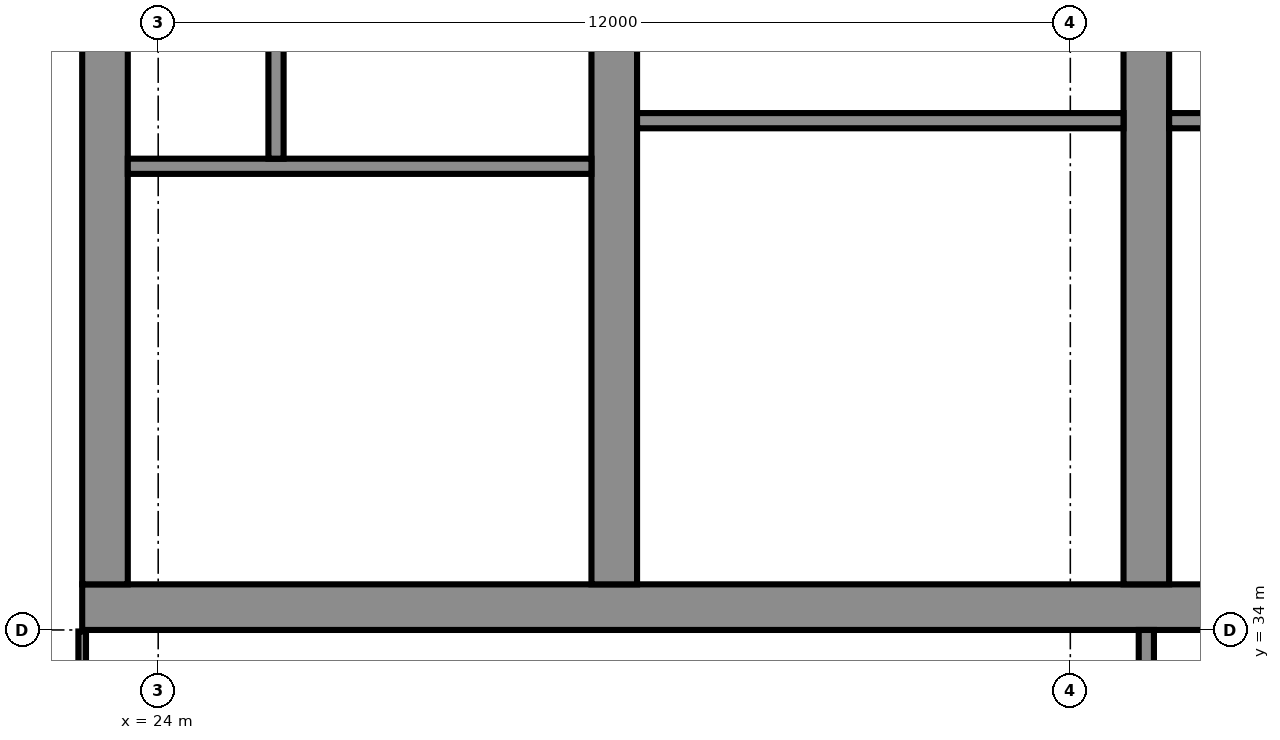
"""IFC4 building model, lengths in metres.
Left out: names, types, materials, properties, quantities, classifications, styles, units other than length and angle.
Written with IfcOpenShell. Run it as: python <this file> out.ifc"""

import sys

from ifc_helpers import new_model, si_unit, direction, frame, frame_2d, origin, place, context, subcontext, project, spatial, polyline, rectangle, outline, extrude, element, fill, save


model = new_model("IFC4")
c1 = context("Model", 3, precision=1e-05, world=origin(), true_north=direction((0.0, 1.0)))
c2 = subcontext(c1, "Body", "Model", "MODEL_VIEW")
j1 = project(units=[si_unit("LENGTHUNIT", "METRE"), si_unit("PLANEANGLEUNIT", "RADIAN")], contexts=[c1])
p1 = place(None, origin())
s1 = spatial("IfcSite", under=j1, at=p1, CompositionType="ELEMENT")
p2 = place(p1, origin())
s2 = spatial("IfcBuilding", under=s1, at=p2, CompositionType="ELEMENT")
p3 = place(p2, frame((0.0, 0.0, 207.1)))
s3 = spatial("IfcBuildingStorey", under=s2, at=p3, CompositionType="ELEMENT", Elevation=207.1)
p4 = place(p3, frame((23.0, 34.3, 0.0), z_axis=(0.0, 0.0, 1.0), x_axis=(1.0, 0.0, 0.0)))
e1 = element("IfcWall", 1, at=p4, inside=s3, PredefinedType="SHEAR", context=c2, shape_type="SweptSolid", body=[
    extrude(rectangle(XDim=35.0, YDim=0.6, at=frame_2d((17.5, 0.0))), origin(), (0.0, 0.0, 1.0), 3.6),
])
p5 = place(p4, frame((0.65, 0.0, 0.0)))
e2 = element("IfcOpeningElement", 2, at=p5, cuts=e1, PredefinedType="OPENING", context=c2, shape_type="SweptSolid", body=[
    extrude(rectangle(XDim=1.2, YDim=2.1, at=frame_2d((0.6, 1.05))), frame((0.0, 0.31, 0.0), z_axis=(0.0, -1.0, 0.0), x_axis=(1.0, 0.0, 0.0)), (0.0, 0.0, 1.0), 0.62),
])
p6 = place(p4, frame((7.717, 0.0, 0.0)))
e3 = element("IfcOpeningElement", 3, at=p6, cuts=e1, PredefinedType="OPENING", context=c2, shape_type="SweptSolid", body=[
    extrude(rectangle(XDim=1.1, YDim=2.1, at=frame_2d((0.55, 1.05))), frame((0.0, 0.31, 0.0), z_axis=(0.0, -1.0, 0.0), x_axis=(1.0, 0.0, 0.0)), (0.0, 0.0, 1.0), 0.62),
])
p7 = place(p4, frame((12.183, 0.0, 0.0)))
e4 = element("IfcOpeningElement", 4, at=p7, cuts=e1, PredefinedType="OPENING", context=c2, shape_type="SweptSolid", body=[
    extrude(rectangle(XDim=1.1, YDim=2.1, at=frame_2d((0.55, 1.05))), frame((0.0, 0.31, 0.0), z_axis=(0.0, -1.0, 0.0), x_axis=(1.0, 0.0, 0.0)), (0.0, 0.0, 1.0), 0.62),
])
p8 = place(p4, frame((9.8, 0.0, 0.0)))
e5 = element("IfcOpeningElement", 5, at=p8, cuts=e1, PredefinedType="OPENING", context=c2, shape_type="SweptSolid", body=[
    extrude(rectangle(XDim=1.4, YDim=2.1, at=frame_2d((0.7, 1.05))), frame((0.0, 0.31, 0.0), z_axis=(0.0, -1.0, 0.0), x_axis=(1.0, 0.0, 0.0)), (0.0, 0.0, 1.0), 0.62),
])
p9 = place(p4, frame((14.717, 0.0, 0.0)))
e6 = element("IfcOpeningElement", 6, at=p9, cuts=e1, PredefinedType="OPENING", context=c2, shape_type="SweptSolid", body=[
    extrude(rectangle(XDim=1.1, YDim=2.1, at=frame_2d((0.55, 1.05))), frame((0.0, 0.31, 0.0), z_axis=(0.0, -1.0, 0.0), x_axis=(1.0, 0.0, 0.0)), (0.0, 0.0, 1.0), 0.62),
])
p10 = place(p4, frame((16.95, 0.0, 0.0)))
e7 = element("IfcOpeningElement", 7, at=p10, cuts=e1, PredefinedType="OPENING", context=c2, shape_type="SweptSolid", body=[
    extrude(rectangle(XDim=1.1, YDim=2.1, at=frame_2d((0.55, 1.05))), frame((0.0, 0.31, 0.0), z_axis=(0.0, -1.0, 0.0), x_axis=(1.0, 0.0, 0.0)), (0.0, 0.0, 1.0), 0.62),
])
p11 = place(p4, frame((19.183, 0.0, 0.0)))
e8 = element("IfcOpeningElement", 8, at=p11, cuts=e1, PredefinedType="OPENING", context=c2, shape_type="SweptSolid", body=[
    extrude(rectangle(XDim=1.1, YDim=2.1, at=frame_2d((0.55, 1.05))), frame((0.0, 0.31, 0.0), z_axis=(0.0, -1.0, 0.0), x_axis=(1.0, 0.0, 0.0)), (0.0, 0.0, 1.0), 0.62),
])
p12 = place(p4, frame((26.15, 0.0, 0.0)))
e9 = element("IfcOpeningElement", 9, at=p12, cuts=e1, PredefinedType="OPENING", context=c2, shape_type="SweptSolid", body=[
    extrude(rectangle(XDim=1.2, YDim=2.1, at=frame_2d((0.6, 1.05))), frame((0.0, 0.31, 0.0), z_axis=(0.0, -1.0, 0.0), x_axis=(1.0, 0.0, 0.0)), (0.0, 0.0, 1.0), 0.62),
])
p13 = place(p4, frame((28.767, 0.0, 0.0)))
e10 = element("IfcOpeningElement", 10, at=p13, cuts=e1, PredefinedType="OPENING", context=c2, shape_type="SweptSolid", body=[
    extrude(rectangle(XDim=1.0, YDim=2.1, at=frame_2d((0.5, 1.05))), frame((0.0, 0.31, 0.0), z_axis=(0.0, -1.0, 0.0), x_axis=(1.0, 0.0, 0.0)), (0.0, 0.0, 1.0), 0.62),
])
p14 = place(p4, frame((33.083, 0.0, 0.0)))
e11 = element("IfcOpeningElement", 11, at=p14, cuts=e1, PredefinedType="OPENING", context=c2, shape_type="SweptSolid", body=[
    extrude(rectangle(XDim=1.0, YDim=2.1, at=frame_2d((0.5, 1.05))), frame((0.0, 0.31, 0.0), z_axis=(0.0, -1.0, 0.0), x_axis=(1.0, 0.0, 0.0)), (0.0, 0.0, 1.0), 0.62),
])
p15 = place(p4, frame((30.8, 0.0, 0.0)))
e12 = element("IfcOpeningElement", 12, at=p15, cuts=e1, PredefinedType="OPENING", context=c2, shape_type="SweptSolid", body=[
    extrude(rectangle(XDim=1.4, YDim=2.1, at=frame_2d((0.7, 1.05))), frame((0.0, 0.31, 0.0), z_axis=(0.0, -1.0, 0.0), x_axis=(1.0, 0.0, 0.0)), (0.0, 0.0, 1.0), 0.62),
])
p16 = place(p3, frame((23.3, 34.6, 0.0), z_axis=(0.0, 0.0, 1.0), x_axis=(0.0, 1.0, 0.0)))
e13 = element("IfcWall", 13, at=p16, inside=s3, PredefinedType="SHEAR", context=c2, shape_type="SweptSolid", body=[
    extrude(rectangle(XDim=13.585, YDim=0.6, at=frame_2d((6.792, 0.0))), origin(), (0.0, 0.0, 1.0), 3.6),
])
p17 = place(p3, frame((30.0, 34.6, 0.0), z_axis=(0.0, 0.0, 1.0), x_axis=(0.0, 1.0, 0.0)))
e14 = element("IfcWall", 14, at=p17, inside=s3, PredefinedType="SHEAR", context=c2, shape_type="SweptSolid", body=[
    extrude(rectangle(XDim=14.171, YDim=0.6, at=frame_2d((7.085, 0.0))), origin(), (0.0, 0.0, 1.0), 3.6),
])
p18 = place(p17, frame((3.8, 0.0, 0.0)))
e15 = element("IfcOpeningElement", 15, at=p18, cuts=e14, PredefinedType="OPENING", context=c2, shape_type="SweptSolid", body=[
    extrude(rectangle(XDim=1.1, YDim=2.1, at=frame_2d((0.55, 1.05))), frame((0.0, 0.31, 0.0), z_axis=(0.0, -1.0, 0.0), x_axis=(1.0, 0.0, 0.0)), (0.0, 0.0, 1.0), 0.62),
])
p19 = place(p3, frame((37.0, 34.6, 0.0), z_axis=(0.0, 0.0, 1.0), x_axis=(0.0, 1.0, 0.0)))
e16 = element("IfcWall", 16, at=p19, inside=s3, PredefinedType="SHEAR", context=c2, shape_type="SweptSolid", body=[
    extrude(rectangle(XDim=14.784, YDim=0.6, at=frame_2d((7.392, 0.0))), origin(), (0.0, 0.0, 1.0), 3.6),
])
p20 = place(p19, frame((11.302, 0.0, 0.0)))
e17 = element("IfcOpeningElement", 17, at=p20, cuts=e16, PredefinedType="OPENING", context=c2, shape_type="SweptSolid", body=[
    extrude(rectangle(XDim=1.0, YDim=2.1, at=frame_2d((0.5, 1.05))), frame((0.0, 0.31, 0.0), z_axis=(0.0, -1.0, 0.0), x_axis=(1.0, 0.0, 0.0)), (0.0, 0.0, 1.0), 0.62),
])
p21 = place(p19, frame((3.8, 0.0, 0.0)))
e18 = element("IfcOpeningElement", 18, at=p21, cuts=e16, PredefinedType="OPENING", context=c2, shape_type="SweptSolid", body=[
    extrude(rectangle(XDim=1.1, YDim=2.1, at=frame_2d((0.55, 1.05))), frame((0.0, 0.31, 0.0), z_axis=(0.0, -1.0, 0.0), x_axis=(1.0, 0.0, 0.0)), (0.0, 0.0, 1.0), 0.62),
])
p22 = place(p3, frame((23.6, 40.1, 0.0), z_axis=(0.0, 0.0, 1.0), x_axis=(1.0, 0.0, 0.0)))
e19 = element("IfcWall", 19, at=p22, inside=s3, PredefinedType="SHEAR", context=c2, shape_type="SweptSolid", body=[
    extrude(rectangle(XDim=6.1, YDim=0.2, at=frame_2d((3.05, 0.0))), origin(), (0.0, 0.0, 1.0), 3.2),
])
p23 = place(p22, frame((3.325, 0.0, 0.0)))
e20 = element("IfcOpeningElement", 20, at=p23, cuts=e19, PredefinedType="OPENING", context=c2, shape_type="SweptSolid", body=[
    extrude(rectangle(XDim=1.2, YDim=2.1, at=frame_2d((0.6, 1.05))), frame((0.0, 0.11, 0.0), z_axis=(0.0, -1.0, 0.0), x_axis=(1.0, 0.0, 0.0)), (0.0, 0.0, 1.0), 0.22),
])
p24 = place(p22, frame((0.475, 0.0, 0.0)))
e21 = element("IfcOpeningElement", 21, at=p24, cuts=e19, PredefinedType="OPENING", context=c2, shape_type="SweptSolid", body=[
    extrude(rectangle(XDim=0.9, YDim=2.1, at=frame_2d((0.45, 1.05))), frame((0.0, 0.11, 0.0), z_axis=(0.0, -1.0, 0.0), x_axis=(1.0, 0.0, 0.0)), (0.0, 0.0, 1.0), 0.22),
])
p25 = place(p3, frame((25.55, 40.2, 0.0), z_axis=(0.0, 0.0, 1.0), x_axis=(0.0, 1.0, 0.0)))
e22 = element("IfcWall", 22, at=p25, inside=s3, PredefinedType="SHEAR", context=c2, shape_type="SweptSolid", body=[
    extrude(rectangle(XDim=7.2, YDim=0.2, at=frame_2d((3.6, 0.0))), origin(), (0.0, 0.0, 1.0), 3.2),
])
p26 = place(p3, frame((30.3, 40.7, 0.0), z_axis=(0.0, 0.0, 1.0), x_axis=(1.0, 0.0, 0.0)))
e23 = element("IfcWall", 23, at=p26, inside=s3, PredefinedType="PARTITIONING", context=c2, shape_type="SweptSolid", body=[
    extrude(rectangle(XDim=6.4, YDim=0.2, at=frame_2d((3.2, 0.0))), origin(), (0.0, 0.0, 1.0), 3.2),
])
p27 = place(p26, frame((0.417, 0.0, 0.0)))
e24 = element("IfcOpeningElement", 24, at=p27, cuts=e23, PredefinedType="OPENING", context=c2, shape_type="SweptSolid", body=[
    extrude(rectangle(XDim=1.1, YDim=2.1, at=frame_2d((0.55, 1.05))), frame((0.0, 0.11, 0.0), z_axis=(0.0, -1.0, 0.0), x_axis=(1.0, 0.0, 0.0)), (0.0, 0.0, 1.0), 0.22),
])
p28 = place(p26, frame((2.65, 0.0, 0.0)))
e25 = element("IfcOpeningElement", 25, at=p28, cuts=e23, PredefinedType="OPENING", context=c2, shape_type="SweptSolid", body=[
    extrude(rectangle(XDim=1.1, YDim=2.1, at=frame_2d((0.55, 1.05))), frame((0.0, 0.11, 0.0), z_axis=(0.0, -1.0, 0.0), x_axis=(1.0, 0.0, 0.0)), (0.0, 0.0, 1.0), 0.22),
])
p29 = place(p26, frame((4.883, 0.0, 0.0)))
e26 = element("IfcOpeningElement", 26, at=p29, cuts=e23, PredefinedType="OPENING", context=c2, shape_type="SweptSolid", body=[
    extrude(rectangle(XDim=1.1, YDim=2.1, at=frame_2d((0.55, 1.05))), frame((0.0, 0.11, 0.0), z_axis=(0.0, -1.0, 0.0), x_axis=(1.0, 0.0, 0.0)), (0.0, 0.0, 1.0), 0.22),
])
p30 = place(p3, frame((0.0, 0.0, -0.0)))
e27 = element("IfcWall", 27, at=p30, inside=s3, PredefinedType="PARTITIONING", context=c2, shape_type="SweptSolid", body=[
    extrude(outline(polyline([(32.233, 37.45), (30.3, 37.45), (30.3, 37.65), (32.233, 37.65), (32.433, 37.65), (32.433, 34.6), (32.233, 34.6), (32.233, 37.45)])), origin(), (0.0, 0.0, 1.0), 3.2),
])
p31 = place(p3, frame((0.0, 0.0, -0.0)))
e28 = element("IfcWall", 28, at=p31, inside=s3, PredefinedType="PARTITIONING", context=c2, shape_type="SweptSolid", body=[
    extrude(outline(polyline([(34.567, 37.65), (34.767, 37.65), (36.7, 37.65), (36.7, 37.45), (34.767, 37.45), (34.767, 34.6), (34.567, 34.6), (34.567, 37.65)])), origin(), (0.0, 0.0, 1.0), 3.2),
])
p32 = place(p3, frame((0.0, 0.0, -0.0)))
e29 = element("IfcWall", 29, at=p32, inside=s3, PredefinedType="PARTITIONING", context=c2, shape_type="SweptSolid", body=[
    extrude(outline(polyline([(32.433, 40.8), (32.233, 40.8), (32.233, 43.8), (30.3, 43.8), (30.3, 44.0), (36.7, 44.0), (36.7, 43.8), (34.767, 43.8), (34.767, 40.8), (34.567, 40.8), (34.567, 43.8), (32.433, 43.8), (32.433, 40.8)])), origin(), (0.0, 0.0, 1.0), 3.2),
])
p33 = place(p3, frame((37.3, 40.7, 0.0), z_axis=(0.0, 0.0, 1.0), x_axis=(1.0, 0.0, 0.0)))
e30 = element("IfcWall", 30, at=p33, inside=s3, PredefinedType="PARTITIONING", context=c2, shape_type="SweptSolid", body=[
    extrude(rectangle(XDim=6.4, YDim=0.2, at=frame_2d((3.2, 0.0))), origin(), (0.0, 0.0, 1.0), 3.2),
])
p34 = place(p33, frame((0.417, 0.0, 0.0)))
e31 = element("IfcOpeningElement", 31, at=p34, cuts=e30, PredefinedType="OPENING", context=c2, shape_type="SweptSolid", body=[
    extrude(rectangle(XDim=1.1, YDim=2.1, at=frame_2d((0.55, 1.05))), frame((0.0, 0.11, 0.0), z_axis=(0.0, -1.0, 0.0), x_axis=(1.0, 0.0, 0.0)), (0.0, 0.0, 1.0), 0.22),
])
p35 = place(p33, frame((2.65, 0.0, 0.0)))
e32 = element("IfcOpeningElement", 32, at=p35, cuts=e30, PredefinedType="OPENING", context=c2, shape_type="SweptSolid", body=[
    extrude(rectangle(XDim=1.1, YDim=2.1, at=frame_2d((0.55, 1.05))), frame((0.0, 0.11, 0.0), z_axis=(0.0, -1.0, 0.0), x_axis=(1.0, 0.0, 0.0)), (0.0, 0.0, 1.0), 0.22),
])
p36 = place(p33, frame((4.883, 0.0, 0.0)))
e33 = element("IfcOpeningElement", 33, at=p36, cuts=e30, PredefinedType="OPENING", context=c2, shape_type="SweptSolid", body=[
    extrude(rectangle(XDim=1.1, YDim=2.1, at=frame_2d((0.55, 1.05))), frame((0.0, 0.11, 0.0), z_axis=(0.0, -1.0, 0.0), x_axis=(1.0, 0.0, 0.0)), (0.0, 0.0, 1.0), 0.22),
])
p37 = place(p3, frame((0.0, 0.0, -0.0)))
e34 = element("IfcWall", 34, at=p37, inside=s3, PredefinedType="PARTITIONING", context=c2, shape_type="SweptSolid", body=[
    extrude(outline(polyline([(41.567, 37.1), (39.433, 37.1), (39.433, 34.6), (39.233, 34.6), (39.233, 37.45), (37.3, 37.45), (37.3, 37.65), (39.233, 37.65), (39.433, 37.65), (39.433, 37.3), (41.567, 37.3), (41.567, 37.35), (41.767, 37.35), (43.7, 37.35), (43.7, 37.15), (41.767, 37.15), (41.767, 34.6), (41.567, 34.6), (41.567, 37.1)])), origin(), (0.0, 0.0, 1.0), 3.2),
])
p38 = place(p3, frame((0.0, 0.0, -0.0)))
e35 = element("IfcWall", 35, at=p38, inside=s3, PredefinedType="PARTITIONING", context=c2, shape_type="SweptSolid", body=[
    extrude(outline(polyline([(39.433, 40.8), (39.233, 40.8), (39.233, 43.8), (37.3, 43.8), (37.3, 44.0), (43.7, 44.0), (43.7, 43.8), (41.767, 43.8), (41.767, 40.8), (41.567, 40.8), (41.567, 43.8), (39.433, 43.8), (39.433, 40.8)])), origin(), (0.0, 0.0, 1.0), 3.2),
])
p39 = place(p3, frame((37.0, 30.5, 0.0), z_axis=(0.0, 0.0, 1.0), x_axis=(0.0, 1.0, 0.0)))
e36 = element("IfcWall", 36, at=p39, inside=s3, PredefinedType="PARTITIONING", context=c2, shape_type="SweptSolid", body=[
    extrude(rectangle(XDim=3.5, YDim=0.2, at=frame_2d((1.75, 0.0))), origin(), (0.0, 0.0, 1.0), 3.2),
])
p40 = place(p39, frame((1.2, 0.0, 0.0)))
e37 = element("IfcOpeningElement", 37, at=p40, cuts=e36, PredefinedType="OPENING", context=c2, shape_type="SweptSolid", body=[
    extrude(rectangle(XDim=1.1, YDim=2.1, at=frame_2d((0.55, 1.05))), frame((0.0, 0.11, 0.0), z_axis=(0.0, -1.0, 0.0), x_axis=(1.0, 0.0, 0.0)), (0.0, 0.0, 1.0), 0.22),
])
p41 = place(p3, frame((23.0, 30.5, 0.0), z_axis=(0.0, 0.0, 1.0), x_axis=(0.0, 1.0, 0.0)))
e38 = element("IfcWall", 38, at=p41, inside=s3, PredefinedType="PARTITIONING", context=c2, shape_type="SweptSolid", body=[
    extrude(rectangle(XDim=3.48, YDim=0.1, at=frame_2d((1.74, 0.0))), origin(), (0.0, 0.0, 1.0), 3.2),
])
p42 = place(p41, frame((1.28, 0.0, 0.0)))
e39 = element("IfcOpeningElement", 39, at=p42, cuts=e38, PredefinedType="OPENING", context=c2, shape_type="SweptSolid", body=[
    extrude(rectangle(XDim=1.0, YDim=2.1, at=frame_2d((0.5, 1.05))), frame((0.0, 0.06, 0.0), z_axis=(0.0, -1.0, 0.0), x_axis=(1.0, 0.0, 0.0)), (0.0, 0.0, 1.0), 0.12),
])
p43 = place(p23, origin())
e40 = element("IfcDoor", 40, at=p43, inside=s3, OperationType="SINGLE_SWING_RIGHT", PredefinedType="DOOR", context=c2, shape_type="SweptSolid", body=[
    extrude(rectangle(XDim=1.2, YDim=2.1, at=frame_2d((0.6, 1.05))), frame((0.0, 0.025, 0.0), z_axis=(0.0, -1.0, 0.0), x_axis=(1.0, 0.0, 0.0)), (0.0, 0.0, 1.0), 0.05),
])
fill(e20, e40)
p44 = place(p24, origin())
e41 = element("IfcDoor", 41, at=p44, inside=s3, OperationType="SINGLE_SWING_LEFT", PredefinedType="DOOR", context=c2, shape_type="SweptSolid", body=[
    extrude(rectangle(XDim=0.9, YDim=2.1, at=frame_2d((0.45, 1.05))), frame((0.0, 0.025, 0.0), z_axis=(0.0, -1.0, 0.0), x_axis=(1.0, 0.0, 0.0)), (0.0, 0.0, 1.0), 0.05),
])
fill(e21, e41)
p45 = place(p5, origin())
e42 = element("IfcDoor", 42, at=p45, inside=s3, OperationType="SINGLE_SWING_LEFT", PredefinedType="DOOR", context=c2, shape_type="SweptSolid", body=[
    extrude(rectangle(XDim=1.2, YDim=2.1, at=frame_2d((0.6, 1.05))), frame((0.0, 0.025, 0.0), z_axis=(0.0, -1.0, 0.0), x_axis=(1.0, 0.0, 0.0)), (0.0, 0.0, 1.0), 0.05),
])
fill(e2, e42)
p46 = place(p6, origin())
e43 = element("IfcDoor", 43, at=p46, inside=s3, OperationType="DOUBLE_DOOR_SLIDING", PredefinedType="DOOR", context=c2, shape_type="SweptSolid", body=[
    extrude(rectangle(XDim=1.1, YDim=2.1, at=frame_2d((0.55, 1.05))), frame((0.0, 0.025, 0.0), z_axis=(0.0, -1.0, 0.0), x_axis=(1.0, 0.0, 0.0)), (0.0, 0.0, 1.0), 0.05),
])
fill(e3, e43)
p47 = place(p7, origin())
e44 = element("IfcDoor", 44, at=p47, inside=s3, OperationType="DOUBLE_DOOR_SLIDING", PredefinedType="DOOR", context=c2, shape_type="SweptSolid", body=[
    extrude(rectangle(XDim=1.1, YDim=2.1, at=frame_2d((0.55, 1.05))), frame((0.0, 0.025, 0.0), z_axis=(0.0, -1.0, 0.0), x_axis=(1.0, 0.0, 0.0)), (0.0, 0.0, 1.0), 0.05),
])
fill(e4, e44)
p48 = place(p8, origin())
e45 = element("IfcDoor", 45, at=p48, inside=s3, OperationType="DOUBLE_DOOR_SINGLE_SWING", PredefinedType="DOOR", context=c2, shape_type="SweptSolid", body=[
    extrude(rectangle(XDim=1.4, YDim=2.1, at=frame_2d((0.7, 1.05))), frame((0.0, 0.025, 0.0), z_axis=(0.0, -1.0, 0.0), x_axis=(1.0, 0.0, 0.0)), (0.0, 0.0, 1.0), 0.05),
])
fill(e5, e45)
p49 = place(p27, origin())
e46 = element("IfcDoor", 46, at=p49, inside=s3, OperationType="DOUBLE_DOOR_SLIDING", PredefinedType="DOOR", context=c2, shape_type="SweptSolid", body=[
    extrude(rectangle(XDim=1.1, YDim=2.1, at=frame_2d((0.55, 1.05))), frame((0.0, 0.025, 0.0), z_axis=(0.0, -1.0, 0.0), x_axis=(1.0, 0.0, 0.0)), (0.0, 0.0, 1.0), 0.05),
])
fill(e24, e46)
p50 = place(p28, origin())
e47 = element("IfcDoor", 47, at=p50, inside=s3, OperationType="DOUBLE_DOOR_SLIDING", PredefinedType="DOOR", context=c2, shape_type="SweptSolid", body=[
    extrude(rectangle(XDim=1.1, YDim=2.1, at=frame_2d((0.55, 1.05))), frame((0.0, 0.025, 0.0), z_axis=(0.0, -1.0, 0.0), x_axis=(1.0, 0.0, 0.0)), (0.0, 0.0, 1.0), 0.05),
])
fill(e25, e47)
p51 = place(p29, origin())
e48 = element("IfcDoor", 48, at=p51, inside=s3, OperationType="DOUBLE_DOOR_SLIDING", PredefinedType="DOOR", context=c2, shape_type="SweptSolid", body=[
    extrude(rectangle(XDim=1.1, YDim=2.1, at=frame_2d((0.55, 1.05))), frame((0.0, 0.025, 0.0), z_axis=(0.0, -1.0, 0.0), x_axis=(1.0, 0.0, 0.0)), (0.0, 0.0, 1.0), 0.05),
])
fill(e26, e48)
p52 = place(p18, origin())
e49 = element("IfcDoor", 49, at=p52, inside=s3, OperationType="SINGLE_SWING_LEFT", PredefinedType="DOOR", context=c2, shape_type="SweptSolid", body=[
    extrude(rectangle(XDim=1.1, YDim=2.1, at=frame_2d((0.55, 1.05))), frame((0.0, 0.025, 0.0), z_axis=(0.0, -1.0, 0.0), x_axis=(1.0, 0.0, 0.0)), (0.0, 0.0, 1.0), 0.05),
])
fill(e15, e49)
p53 = place(p21, origin())
e50 = element("IfcDoor", 50, at=p53, inside=s3, OperationType="SINGLE_SWING_RIGHT", PredefinedType="DOOR", context=c2, shape_type="SweptSolid", body=[
    extrude(rectangle(XDim=1.1, YDim=2.1, at=frame_2d((0.55, 1.05))), frame((0.0, 0.025, 0.0), z_axis=(0.0, -1.0, 0.0), x_axis=(1.0, 0.0, 0.0)), (0.0, 0.0, 1.0), 0.05),
])
fill(e18, e50)
save(model, sys.argv[1])
